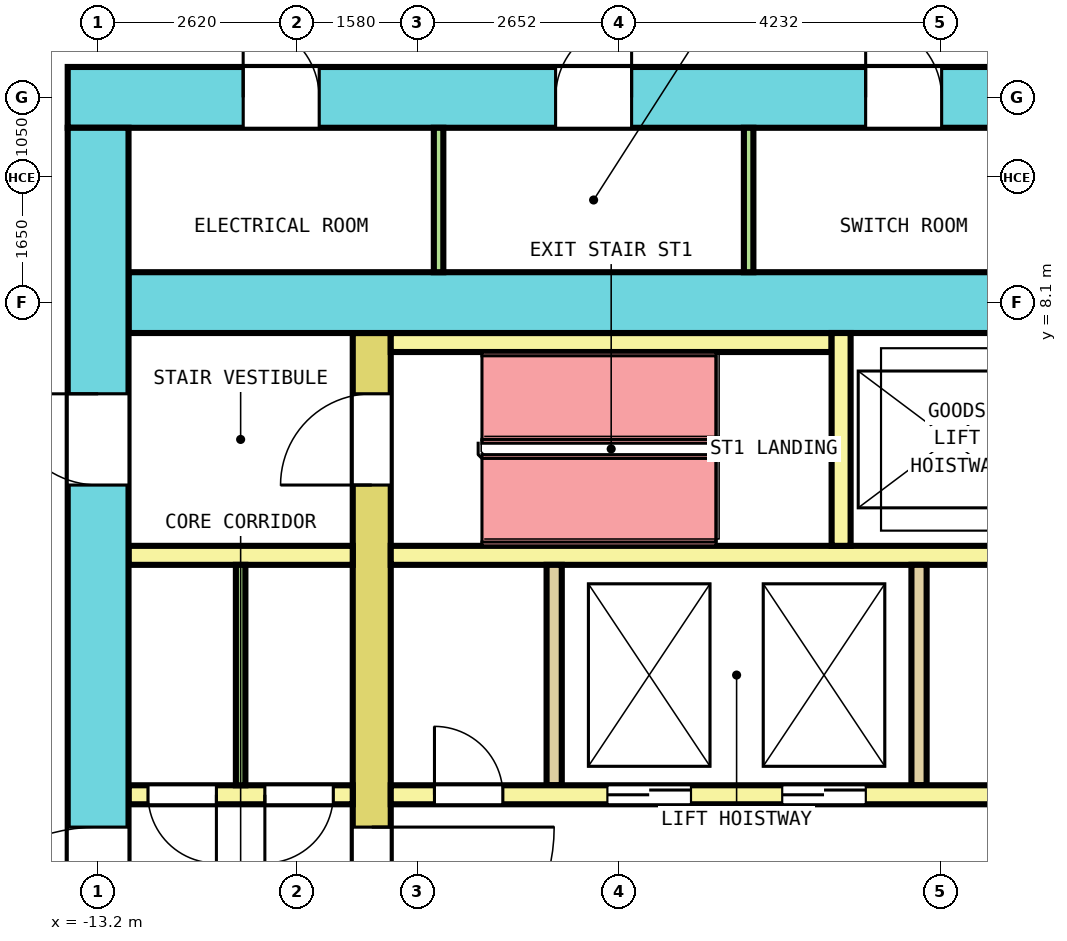
"""IFC4 building model, lengths in metres.
Left out: names, types, materials, properties, quantities, classifications, styles, units other than length and angle.
Written with IfcOpenShell. Run it as: python <this file> out.ifc"""

import sys

from ifc_helpers import new_model, si_unit, direction, frame, frame_2d, origin, place, context, subcontext, project, spatial, rectangle, extrude, element, fill, save


model = new_model("IFC4")
c1 = context("Model", 3, precision=1e-05, world=origin(), true_north=direction((0.0, 1.0)))
c2 = subcontext(c1, "Body", "Model", "MODEL_VIEW")
j1 = project(units=[si_unit("LENGTHUNIT", "METRE"), si_unit("PLANEANGLEUNIT", "RADIAN")], contexts=[c1])
p1 = place(None, origin())
s1 = spatial("IfcSite", under=j1, at=p1, CompositionType="ELEMENT")
p2 = place(p1, origin())
s2 = spatial("IfcBuilding", under=s1, at=p2, CompositionType="ELEMENT")
p3 = place(p2, frame((0.0, 0.0, 113.2)))
s3 = spatial("IfcBuildingStorey", under=s2, at=p3, CompositionType="ELEMENT", Elevation=113.2)
p4 = place(p3, frame((-13.6, 10.8, 0.0), z_axis=(0.0, 0.0, 1.0), x_axis=(1.0, 0.0, 0.0)))
e1 = element("IfcWall", 1, at=p4, inside=s3, PredefinedType="SHEAR", context=c2, shape_type="SweptSolid", body=[
    extrude(rectangle(XDim=27.2, YDim=0.8, at=frame_2d((13.6, 0.0))), origin(), (0.0, 0.0, 1.0), 4.1),
])
p5 = place(p4, frame((2.308, 0.0, 0.0)))
e2 = element("IfcOpeningElement", 2, at=p5, cuts=e1, PredefinedType="OPENING", context=c2, shape_type="SweptSolid", body=[
    extrude(rectangle(XDim=1.0, YDim=2.1, at=frame_2d((0.5, 1.05))), frame((0.0, 0.41, 0.0), z_axis=(0.0, -1.0, 0.0), x_axis=(1.0, 0.0, 0.0)), (0.0, 0.0, 1.0), 0.82),
])
p6 = place(p4, frame((6.419, 0.0, 0.0)))
e3 = element("IfcOpeningElement", 3, at=p6, cuts=e1, PredefinedType="OPENING", context=c2, shape_type="SweptSolid", body=[
    extrude(rectangle(XDim=1.0, YDim=2.1, at=frame_2d((0.5, 1.05))), frame((0.0, 0.41, 0.0), z_axis=(0.0, -1.0, 0.0), x_axis=(1.0, 0.0, 0.0)), (0.0, 0.0, 1.0), 0.82),
])
p7 = place(p4, frame((10.498, 0.0, 0.0)))
e4 = element("IfcOpeningElement", 4, at=p7, cuts=e1, PredefinedType="OPENING", context=c2, shape_type="SweptSolid", body=[
    extrude(rectangle(XDim=1.0, YDim=2.1, at=frame_2d((0.5, 1.05))), frame((0.0, 0.41, 0.0), z_axis=(0.0, -1.0, 0.0), x_axis=(1.0, 0.0, 0.0)), (0.0, 0.0, 1.0), 0.82),
])
p8 = place(p4, frame((18.035, 0.0, 0.0)))
e5 = element("IfcOpeningElement", 5, at=p8, cuts=e1, PredefinedType="OPENING", context=c2, shape_type="SweptSolid", body=[
    extrude(rectangle(XDim=1.0, YDim=2.1, at=frame_2d((0.5, 1.05))), frame((0.0, 0.41, 0.0), z_axis=(0.0, -1.0, 0.0), x_axis=(1.0, 0.0, 0.0)), (0.0, 0.0, 1.0), 0.82),
])
p9 = place(p4, frame((21.181, 0.0, 0.0)))
e6 = element("IfcOpeningElement", 6, at=p9, cuts=e1, PredefinedType="OPENING", context=c2, shape_type="SweptSolid", body=[
    extrude(rectangle(XDim=1.0, YDim=2.1, at=frame_2d((0.5, 1.05))), frame((0.0, 0.41, 0.0), z_axis=(0.0, -1.0, 0.0), x_axis=(1.0, 0.0, 0.0)), (0.0, 0.0, 1.0), 0.82),
])
p10 = place(p4, frame((24.358, 0.0, 0.0)))
e7 = element("IfcOpeningElement", 7, at=p10, cuts=e1, PredefinedType="OPENING", context=c2, shape_type="SweptSolid", body=[
    extrude(rectangle(XDim=1.0, YDim=2.1, at=frame_2d((0.5, 1.05))), frame((0.0, 0.41, 0.0), z_axis=(0.0, -1.0, 0.0), x_axis=(1.0, 0.0, 0.0)), (0.0, 0.0, 1.0), 0.82),
])
p11 = place(p4, frame((14.525, 0.0, 0.0)))
e8 = element("IfcOpeningElement", 8, at=p11, cuts=e1, PredefinedType="OPENING", context=c2, shape_type="SweptSolid", body=[
    extrude(rectangle(XDim=1.4, YDim=2.1, at=frame_2d((0.7, 1.05))), frame((0.0, 0.41, 0.0), z_axis=(0.0, -1.0, 0.0), x_axis=(1.0, 0.0, 0.0)), (0.0, 0.0, 1.0), 0.82),
])
p12 = place(p3, frame((-13.2, -10.4, 0.0), z_axis=(0.0, 0.0, 1.0), x_axis=(0.0, 1.0, 0.0)))
e9 = element("IfcWall", 9, at=p12, inside=s3, PredefinedType="SHEAR", context=c2, shape_type="SweptSolid", body=[
    extrude(rectangle(XDim=20.8, YDim=0.8, at=frame_2d((10.4, 0.0))), origin(), (0.0, 0.0, 1.0), 4.1),
])
p13 = place(p12, frame((9.2, 0.0, 0.0)))
e10 = element("IfcOpeningElement", 10, at=p13, cuts=e9, PredefinedType="OPENING", context=c2, shape_type="SweptSolid", body=[
    extrude(rectangle(XDim=2.4, YDim=2.1, at=frame_2d((1.2, 1.05))), frame((0.0, 0.41, 0.0), z_axis=(0.0, -1.0, 0.0), x_axis=(1.0, 0.0, 0.0)), (0.0, 0.0, 1.0), 0.82),
])
p14 = place(p12, frame((16.1, 0.0, 0.0)))
e11 = element("IfcOpeningElement", 11, at=p14, cuts=e9, PredefinedType="OPENING", context=c2, shape_type="SweptSolid", body=[
    extrude(rectangle(XDim=1.2, YDim=2.1, at=frame_2d((0.6, 1.05))), frame((0.0, 0.41, 0.0), z_axis=(0.0, -1.0, 0.0), x_axis=(1.0, 0.0, 0.0)), (0.0, 0.0, 1.0), 0.82),
])
p15 = place(p12, frame((3.5, 0.0, 0.0)))
e12 = element("IfcOpeningElement", 12, at=p15, cuts=e9, PredefinedType="OPENING", context=c2, shape_type="SweptSolid", body=[
    extrude(rectangle(XDim=1.2, YDim=2.1, at=frame_2d((0.6, 1.05))), frame((0.0, 0.41, 0.0), z_axis=(0.0, -1.0, 0.0), x_axis=(1.0, 0.0, 0.0)), (0.0, 0.0, 1.0), 0.82),
])
p16 = place(p3, frame((-12.8, 8.1, 0.0), z_axis=(0.0, 0.0, 1.0), x_axis=(1.0, 0.0, 0.0)))
e13 = element("IfcWall", 13, at=p16, inside=s3, PredefinedType="SHEAR", context=c2, shape_type="SweptSolid", body=[
    extrude(rectangle(XDim=25.6, YDim=0.8, at=frame_2d((12.8, 0.0))), origin(), (0.0, 0.0, 1.0), 4.1),
])
p17 = place(p16, frame((13.725, 0.0, 0.0)))
e14 = element("IfcOpeningElement", 14, at=p17, cuts=e13, PredefinedType="OPENING", context=c2, shape_type="SweptSolid", body=[
    extrude(rectangle(XDim=1.4, YDim=2.1, at=frame_2d((0.7, 1.05))), frame((0.0, 0.41, 0.0), z_axis=(0.0, -1.0, 0.0), x_axis=(1.0, 0.0, 0.0)), (0.0, 0.0, 1.0), 0.82),
])
p18 = place(p3, frame((-9.6, -7.7, 0.0), z_axis=(0.0, 0.0, 1.0), x_axis=(0.0, 1.0, 0.0)))
e15 = element("IfcWall", 15, at=p18, inside=s3, PredefinedType="SHEAR", context=c2, shape_type="SweptSolid", body=[
    extrude(rectangle(XDim=15.4, YDim=0.5, at=frame_2d((7.7, 0.0))), origin(), (0.0, 0.0, 1.0), 4.1),
])
p19 = place(p18, frame((6.5, 0.0, 0.0)))
e16 = element("IfcOpeningElement", 16, at=p19, cuts=e15, PredefinedType="OPENING", context=c2, shape_type="SweptSolid", body=[
    extrude(rectangle(XDim=2.4, YDim=2.1, at=frame_2d((1.2, 1.05))), frame((0.0, 0.26, 0.0), z_axis=(0.0, -1.0, 0.0), x_axis=(1.0, 0.0, 0.0)), (0.0, 0.0, 1.0), 0.52),
])
p20 = place(p18, frame((13.4, 0.0, 0.0)))
e17 = element("IfcOpeningElement", 17, at=p20, cuts=e15, PredefinedType="OPENING", context=c2, shape_type="SweptSolid", body=[
    extrude(rectangle(XDim=1.2, YDim=2.1, at=frame_2d((0.6, 1.05))), frame((0.0, 0.26, 0.0), z_axis=(0.0, -1.0, 0.0), x_axis=(1.0, 0.0, 0.0)), (0.0, 0.0, 1.0), 0.52),
])
p21 = place(p18, frame((0.8, 0.0, 0.0)))
e18 = element("IfcOpeningElement", 18, at=p21, cuts=e15, PredefinedType="OPENING", context=c2, shape_type="SweptSolid", body=[
    extrude(rectangle(XDim=1.2, YDim=2.1, at=frame_2d((0.6, 1.05))), frame((0.0, 0.26, 0.0), z_axis=(0.0, -1.0, 0.0), x_axis=(1.0, 0.0, 0.0)), (0.0, 0.0, 1.0), 0.52),
])
p22 = place(p3, frame((-12.8, 1.625, 0.0), z_axis=(0.0, 0.0, 1.0), x_axis=(1.0, 0.0, 0.0)))
e19 = element("IfcWall", 19, at=p22, inside=s3, PredefinedType="SOLIDWALL", context=c2, shape_type="SweptSolid", body=[
    extrude(rectangle(XDim=2.95, YDim=0.25, at=frame_2d((1.475, 0.0))), origin(), (0.0, 0.0, 1.0), 4.1),
])
p23 = place(p22, frame((0.256, 0.0, 0.0)))
e20 = element("IfcOpeningElement", 20, at=p23, cuts=e19, PredefinedType="OPENING", context=c2, shape_type="SweptSolid", body=[
    extrude(rectangle(XDim=0.9, YDim=2.1, at=frame_2d((0.45, 1.05))), frame((0.0, 0.135, 0.0), z_axis=(0.0, -1.0, 0.0), x_axis=(1.0, 0.0, 0.0)), (0.0, 0.0, 1.0), 0.27),
])
p24 = place(p22, frame((1.794, 0.0, 0.0)))
e21 = element("IfcOpeningElement", 21, at=p24, cuts=e19, PredefinedType="OPENING", context=c2, shape_type="SweptSolid", body=[
    extrude(rectangle(XDim=0.9, YDim=2.1, at=frame_2d((0.45, 1.05))), frame((0.0, 0.135, 0.0), z_axis=(0.0, -1.0, 0.0), x_axis=(1.0, 0.0, 0.0)), (0.0, 0.0, 1.0), 0.27),
])
p25 = place(p3, frame((-9.35, 1.625, 0.0), z_axis=(0.0, 0.0, 1.0), x_axis=(1.0, 0.0, 0.0)))
e22 = element("IfcWall", 22, at=p25, inside=s3, PredefinedType="SOLIDWALL", context=c2, shape_type="SweptSolid", body=[
    extrude(rectangle(XDim=18.7, YDim=0.25, at=frame_2d((9.35, 0.0))), origin(), (0.0, 0.0, 1.0), 4.1),
])
p26 = place(p25, frame((2.85, 0.0, 0.0)))
e23 = element("IfcOpeningElement", 23, at=p26, cuts=e22, PredefinedType="OPENING", context=c2, shape_type="SweptSolid", body=[
    extrude(rectangle(XDim=1.1, YDim=2.1, at=frame_2d((0.55, 1.05))), frame((0.0, 0.135, 0.0), z_axis=(0.0, -1.0, 0.0), x_axis=(1.0, 0.0, 0.0)), (0.0, 0.0, 1.0), 0.27),
])
p27 = place(p25, frame((5.15, 0.0, 0.0)))
e24 = element("IfcOpeningElement", 24, at=p27, cuts=e22, PredefinedType="OPENING", context=c2, shape_type="SweptSolid", body=[
    extrude(rectangle(XDim=1.1, YDim=2.1, at=frame_2d((0.55, 1.05))), frame((0.0, 0.135, 0.0), z_axis=(0.0, -1.0, 0.0), x_axis=(1.0, 0.0, 0.0)), (0.0, 0.0, 1.0), 0.27),
])
p28 = place(p25, frame((14.8, 0.0, 0.0)))
e25 = element("IfcOpeningElement", 25, at=p28, cuts=e22, PredefinedType="OPENING", context=c2, shape_type="SweptSolid", body=[
    extrude(rectangle(XDim=1.1, YDim=2.1, at=frame_2d((0.55, 1.05))), frame((0.0, 0.135, 0.0), z_axis=(0.0, -1.0, 0.0), x_axis=(1.0, 0.0, 0.0)), (0.0, 0.0, 1.0), 0.27),
])
p29 = place(p25, frame((0.575, 0.0, 0.0)))
e26 = element("IfcOpeningElement", 26, at=p29, cuts=e22, PredefinedType="OPENING", context=c2, shape_type="SweptSolid", body=[
    extrude(rectangle(XDim=0.9, YDim=2.1, at=frame_2d((0.45, 1.05))), frame((0.0, 0.135, 0.0), z_axis=(0.0, -1.0, 0.0), x_axis=(1.0, 0.0, 0.0)), (0.0, 0.0, 1.0), 0.27),
])
p30 = place(p25, frame((17.225, 0.0, 0.0)))
e27 = element("IfcOpeningElement", 27, at=p30, cuts=e22, PredefinedType="OPENING", context=c2, shape_type="SweptSolid", body=[
    extrude(rectangle(XDim=0.9, YDim=2.1, at=frame_2d((0.45, 1.05))), frame((0.0, 0.135, 0.0), z_axis=(0.0, -1.0, 0.0), x_axis=(1.0, 0.0, 0.0)), (0.0, 0.0, 1.0), 0.27),
])
p31 = place(p3, frame((-12.8, 4.775, 0.0), z_axis=(0.0, 0.0, 1.0), x_axis=(1.0, 0.0, 0.0)))
e28 = element("IfcWall", 28, at=p31, inside=s3, PredefinedType="SOLIDWALL", context=c2, shape_type="SweptSolid", body=[
    extrude(rectangle(XDim=2.95, YDim=0.25, at=frame_2d((1.475, 0.0))), origin(), (0.0, 0.0, 1.0), 4.1),
])
p32 = place(p3, frame((-9.35, 4.775, 0.0), z_axis=(0.0, 0.0, 1.0), x_axis=(1.0, 0.0, 0.0)))
e29 = element("IfcWall", 29, at=p32, inside=s3, PredefinedType="SOLIDWALL", context=c2, shape_type="SweptSolid", body=[
    extrude(rectangle(XDim=18.7, YDim=0.25, at=frame_2d((9.35, 0.0))), origin(), (0.0, 0.0, 1.0), 4.1),
])
for number, where, z_axis, x_axis in (
    (30, (-7.2, 1.75, 0.0), (0.0, 0.0, 1.0), (0.0, 1.0, 0.0)),
    (31, (-2.4, 1.75, 0.0), (0.0, 0.0, 1.0), (0.0, 1.0, 0.0)),
):
    element("IfcWall", number, at=place(p3, frame(where, z_axis=z_axis, x_axis=x_axis)), inside=s3, PredefinedType="SOLIDWALL", context=c2, shape_type="SweptSolid", body=[
        extrude(rectangle(XDim=2.9, YDim=0.2, at=frame_2d((1.45, 0.0))), origin(), (0.0, 0.0, 1.0), 4.1),
    ])
p33 = place(p3, frame((-9.35, 7.575, 0.0), z_axis=(0.0, 0.0, 1.0), x_axis=(1.0, 0.0, 0.0)))
e32 = element("IfcWall", 32, at=p33, inside=s3, PredefinedType="SOLIDWALL", context=c2, shape_type="SweptSolid", body=[
    extrude(rectangle(XDim=5.8, YDim=0.25, at=frame_2d((2.9, 0.0))), origin(), (0.0, 0.0, 1.0), 4.1),
])
p34 = place(p3, frame((-3.425, 4.9, 0.0), z_axis=(0.0, 0.0, 1.0), x_axis=(0.0, 1.0, 0.0)))
e33 = element("IfcWall", 33, at=p34, inside=s3, PredefinedType="SOLIDWALL", context=c2, shape_type="SweptSolid", body=[
    extrude(rectangle(XDim=2.8, YDim=0.25, at=frame_2d((1.4, 0.0))), origin(), (0.0, 0.0, 1.0), 4.1),
])
for number, where, z_axis, x_axis in (
    (34, (-8.721, 8.5, 0.0), (0.0, 0.0, 1.0), (0.0, 1.0, 0.0)),
    (35, (-4.642, 8.5, 0.0), (0.0, 0.0, 1.0), (0.0, 1.0, 0.0)),
):
    element("IfcWall", number, at=place(p3, frame(where, z_axis=z_axis, x_axis=x_axis)), inside=s3, PredefinedType="PARTITIONING", context=c2, shape_type="SweptSolid", body=[
        extrude(rectangle(XDim=1.9, YDim=0.125, at=frame_2d((0.95, 0.0))), origin(), (0.0, 0.0, 1.0), 4.1),
    ])
p35 = place(p3, frame((-11.325, 1.75, 0.0), z_axis=(0.0, 0.0, 1.0), x_axis=(0.0, 1.0, 0.0)))
e36 = element("IfcWall", 36, at=p35, inside=s3, PredefinedType="PARTITIONING", context=c2, shape_type="SweptSolid", body=[
    extrude(rectangle(XDim=2.9, YDim=0.125, at=frame_2d((1.45, 0.0))), origin(), (0.0, 0.0, 1.0), 4.1),
])
p36 = place(p26, origin())
e37 = element("IfcDoor", 37, at=p36, inside=s3, OperationType="DOUBLE_DOOR_SLIDING", PredefinedType="DOOR", context=c2, shape_type="SweptSolid", body=[
    extrude(rectangle(XDim=1.1, YDim=2.1, at=frame_2d((0.55, 1.05))), frame((0.0, 0.075, 0.0), z_axis=(0.0, -1.0, 0.0), x_axis=(1.0, 0.0, 0.0)), (0.0, 0.0, 1.0), 0.15),
])
fill(e23, e37)
p37 = place(p27, origin())
e38 = element("IfcDoor", 38, at=p37, inside=s3, OperationType="DOUBLE_DOOR_SLIDING", PredefinedType="DOOR", context=c2, shape_type="SweptSolid", body=[
    extrude(rectangle(XDim=1.1, YDim=2.1, at=frame_2d((0.55, 1.05))), frame((0.0, 0.075, 0.0), z_axis=(0.0, -1.0, 0.0), x_axis=(1.0, 0.0, 0.0)), (0.0, 0.0, 1.0), 0.15),
])
fill(e24, e38)
p38 = place(p19, origin())
e39 = element("IfcDoor", 39, at=p38, inside=s3, OperationType="DOUBLE_DOOR_SINGLE_SWING", PredefinedType="DOOR", context=c2, shape_type="SweptSolid", body=[
    extrude(rectangle(XDim=2.4, YDim=2.1, at=frame_2d((1.2, 1.05))), frame((0.0, 0.2, 0.0), z_axis=(0.0, -1.0, 0.0), x_axis=(1.0, 0.0, 0.0)), (0.0, 0.0, 1.0), 0.4),
])
fill(e16, e39)
p39 = place(p13, origin())
e40 = element("IfcDoor", 40, at=p39, inside=s3, OperationType="DOUBLE_DOOR_SINGLE_SWING", PredefinedType="DOOR", context=c2, shape_type="SweptSolid", body=[
    extrude(rectangle(XDim=2.4, YDim=2.1, at=frame_2d((1.2, 1.05))), frame((0.0, 0.3, 0.0), z_axis=(0.0, -1.0, 0.0), x_axis=(1.0, 0.0, 0.0)), (0.0, 0.0, 1.0), 0.6),
])
fill(e10, e40)
p40 = place(p20, origin())
e41 = element("IfcDoor", 41, at=p40, inside=s3, OperationType="SINGLE_SWING_RIGHT", PredefinedType="DOOR", context=c2, shape_type="SweptSolid", body=[
    extrude(rectangle(XDim=1.2, YDim=2.1, at=frame_2d((0.6, 1.05))), frame((0.0, 0.2, 0.0), z_axis=(0.0, -1.0, 0.0), x_axis=(1.0, 0.0, 0.0)), (0.0, 0.0, 1.0), 0.4),
])
fill(e17, e41)
p41 = place(p14, origin())
e42 = element("IfcDoor", 42, at=p41, inside=s3, OperationType="SINGLE_SWING_LEFT", PredefinedType="DOOR", context=c2, shape_type="SweptSolid", body=[
    extrude(rectangle(XDim=1.2, YDim=2.1, at=frame_2d((0.6, 1.05))), frame((0.0, 0.3, 0.0), z_axis=(0.0, -1.0, 0.0), x_axis=(1.0, 0.0, 0.0)), (0.0, 0.0, 1.0), 0.6),
])
fill(e11, e42)
p42 = place(p5, origin())
e43 = element("IfcDoor", 43, at=p42, inside=s3, OperationType="SINGLE_SWING_RIGHT", PredefinedType="DOOR", context=c2, shape_type="SweptSolid", body=[
    extrude(rectangle(XDim=1.0, YDim=2.1, at=frame_2d((0.5, 1.05))), frame((0.0, 0.3, 0.0), z_axis=(0.0, -1.0, 0.0), x_axis=(1.0, 0.0, 0.0)), (0.0, 0.0, 1.0), 0.6),
])
fill(e2, e43)
p43 = place(p6, origin())
e44 = element("IfcDoor", 44, at=p43, inside=s3, OperationType="SINGLE_SWING_LEFT", PredefinedType="DOOR", context=c2, shape_type="SweptSolid", body=[
    extrude(rectangle(XDim=1.0, YDim=2.1, at=frame_2d((0.5, 1.05))), frame((0.0, 0.3, 0.0), z_axis=(0.0, -1.0, 0.0), x_axis=(1.0, 0.0, 0.0)), (0.0, 0.0, 1.0), 0.6),
])
fill(e3, e44)
p44 = place(p7, origin())
e45 = element("IfcDoor", 45, at=p44, inside=s3, OperationType="SINGLE_SWING_RIGHT", PredefinedType="DOOR", context=c2, shape_type="SweptSolid", body=[
    extrude(rectangle(XDim=1.0, YDim=2.1, at=frame_2d((0.5, 1.05))), frame((0.0, 0.3, 0.0), z_axis=(0.0, -1.0, 0.0), x_axis=(1.0, 0.0, 0.0)), (0.0, 0.0, 1.0), 0.6),
])
fill(e4, e45)
p45 = place(p23, origin())
e46 = element("IfcDoor", 46, at=p45, inside=s3, OperationType="SINGLE_SWING_LEFT", PredefinedType="DOOR", context=c2, shape_type="SweptSolid", body=[
    extrude(rectangle(XDim=0.9, YDim=2.1, at=frame_2d((0.45, 1.05))), frame((0.0, 0.075, 0.0), z_axis=(0.0, -1.0, 0.0), x_axis=(1.0, 0.0, 0.0)), (0.0, 0.0, 1.0), 0.15),
])
fill(e20, e46)
p46 = place(p24, origin())
e47 = element("IfcDoor", 47, at=p46, inside=s3, OperationType="SINGLE_SWING_RIGHT", PredefinedType="DOOR", context=c2, shape_type="SweptSolid", body=[
    extrude(rectangle(XDim=0.9, YDim=2.1, at=frame_2d((0.45, 1.05))), frame((0.0, 0.075, 0.0), z_axis=(0.0, -1.0, 0.0), x_axis=(1.0, 0.0, 0.0)), (0.0, 0.0, 1.0), 0.15),
])
fill(e21, e47)
p47 = place(p29, origin())
e48 = element("IfcDoor", 48, at=p47, inside=s3, OperationType="SINGLE_SWING_LEFT", PredefinedType="DOOR", context=c2, shape_type="SweptSolid", body=[
    extrude(rectangle(XDim=0.9, YDim=2.1, at=frame_2d((0.45, 1.05))), frame((0.0, 0.075, 0.0), z_axis=(0.0, -1.0, 0.0), x_axis=(1.0, 0.0, 0.0)), (0.0, 0.0, 1.0), 0.15),
])
fill(e26, e48)
save(model, sys.argv[1])
